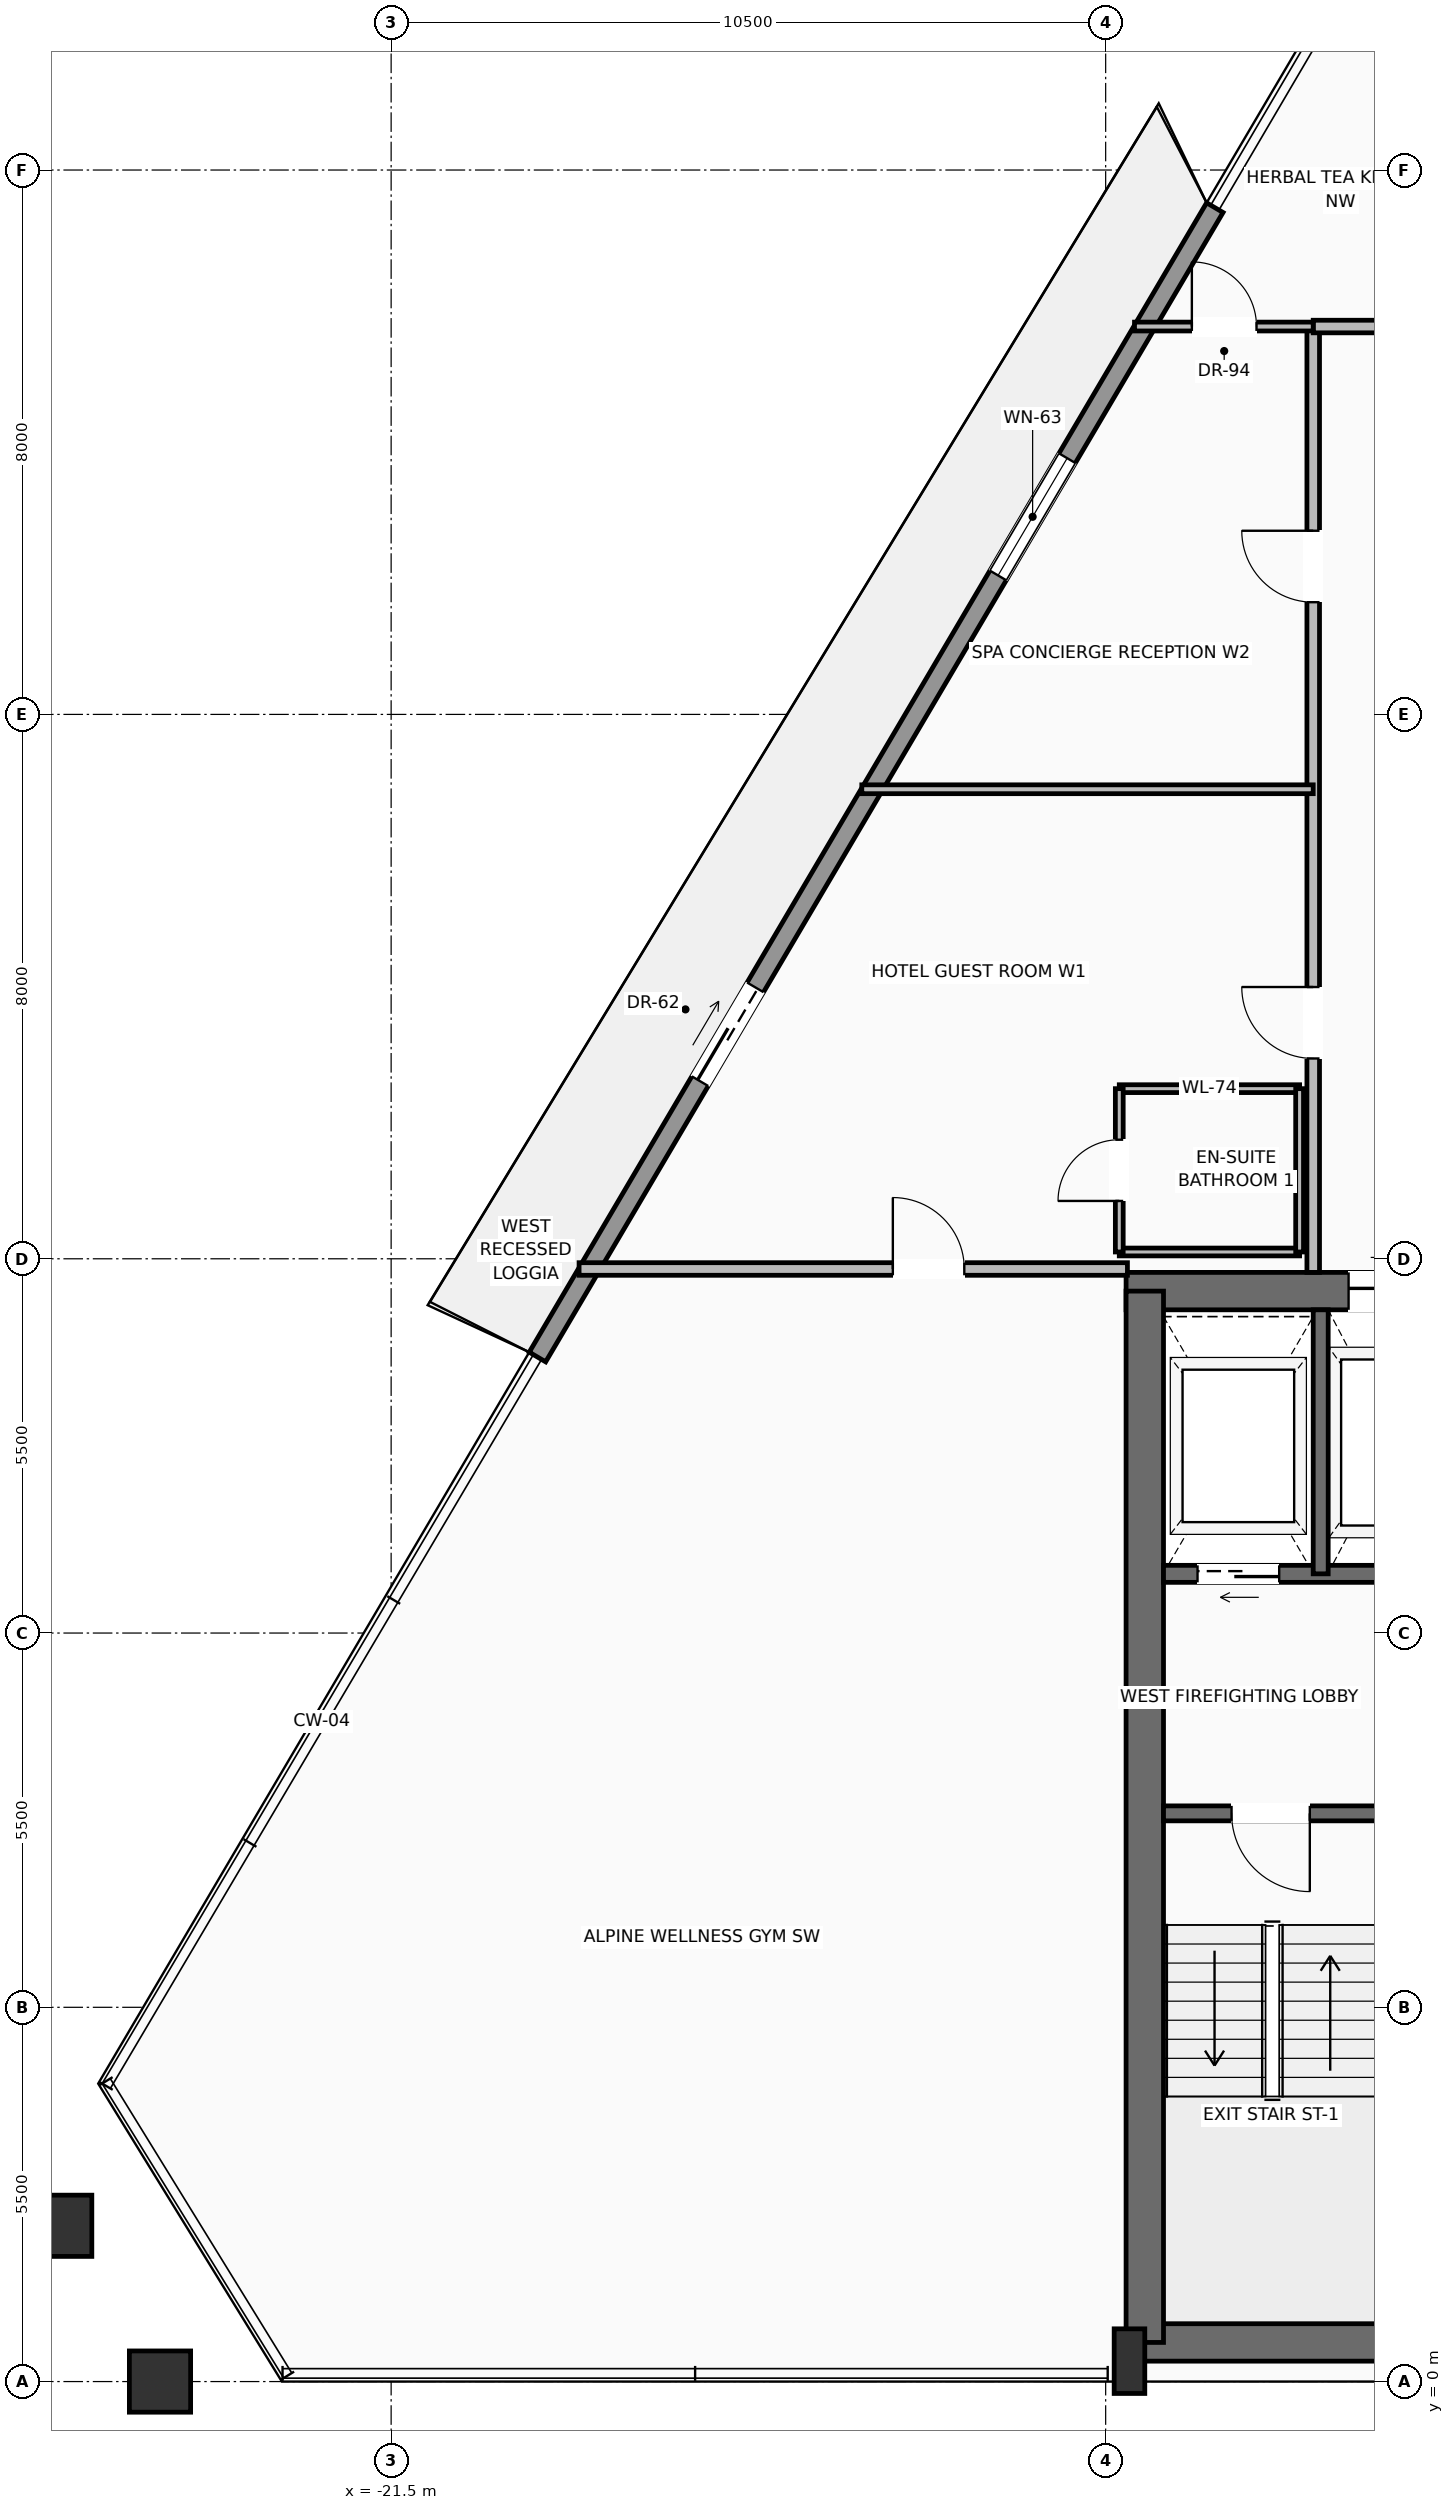
"""IFC4 building model, lengths in metres.
Left out: names, types, materials, properties, quantities, classifications, styles, units other than length and angle.
Written with IfcOpenShell. Run it as: python <this file> out.ifc"""

import sys

from ifc_helpers import new_model, si_unit, direction, frame, frame_2d, origin, origin_2d, place, context, subcontext, project, spatial, rectangle, hollow_rectangle, extrude, source, transform, mapped, element, fill, save


model = new_model("IFC4")
c1 = context("Model", 3, precision=1e-05, world=origin(), true_north=direction((0.0, 1.0)))
c2 = subcontext(c1, "Body", "Model", "MODEL_VIEW")
j1 = project(units=[si_unit("LENGTHUNIT", "METRE"), si_unit("PLANEANGLEUNIT", "RADIAN")], contexts=[c1])
p1 = place(None, origin())
s1 = spatial("IfcSite", under=j1, at=p1, CompositionType="ELEMENT")
p2 = place(p1, origin())
s2 = spatial("IfcBuilding", under=s1, at=p2, CompositionType="ELEMENT")
p3 = place(p2, frame((0.0, 0.0, 240.7)))
s3 = spatial("IfcBuildingStorey", under=s2, at=p3, CompositionType="ELEMENT", Elevation=240.7)
p4 = place(p3, frame((-10.65, 0.575, 0.0), z_axis=(0.0, 0.0, 1.0), x_axis=(1.0, 0.0, 0.0)))
e1 = element("IfcWall", 1, at=p4, inside=s3, PredefinedType="SHEAR", context=c2, shape_type="SweptSolid", body=[
    extrude(rectangle(XDim=21.3, YDim=0.55, at=frame_2d((10.65, 0.0))), origin(), (0.0, 0.0, 1.0), 3.24),
])
p5 = place(p3, frame((-10.7, 16.025, 0.0), z_axis=(0.0, 0.0, 1.0), x_axis=(1.0, 0.0, 0.0)))
e2 = element("IfcWall", 2, at=p5, inside=s3, PredefinedType="SHEAR", context=c2, shape_type="SweptSolid", body=[
    extrude(rectangle(XDim=21.4, YDim=0.55, at=frame_2d((10.7, 0.0))), origin(), (0.0, 0.0, 1.0), 3.24),
])
p6 = place(p5, frame((3.27, 0.0, 0.0)))
e3 = element("IfcOpeningElement", 3, at=p6, cuts=e2, PredefinedType="OPENING", context=c2, shape_type="SweptSolid", body=[
    extrude(rectangle(XDim=1.3, YDim=2.3, at=frame_2d((0.65, 1.15))), frame((0.0, 0.285, 0.0), z_axis=(0.0, -1.0, 0.0), x_axis=(1.0, 0.0, 0.0)), (0.0, 0.0, 1.0), 0.57),
])
p7 = place(p5, frame((9.7, 0.0, 0.0)))
e4 = element("IfcOpeningElement", 4, at=p7, cuts=e2, PredefinedType="OPENING", context=c2, shape_type="SweptSolid", body=[
    extrude(rectangle(XDim=2.0, YDim=2.4, at=frame_2d((1.0, 1.2))), frame((0.0, 0.285, 0.0), z_axis=(0.0, -1.0, 0.0), x_axis=(1.0, 0.0, 0.0)), (0.0, 0.0, 1.0), 0.57),
])
p8 = place(p3, frame((-10.425, 0.575, 0.0), z_axis=(0.0, 0.0, 1.0), x_axis=(0.0, 1.0, 0.0)))
e5 = element("IfcWall", 5, at=p8, inside=s3, PredefinedType="SHEAR", context=c2, shape_type="SweptSolid", body=[
    extrude(rectangle(XDim=15.45, YDim=0.55, at=frame_2d((7.725, 0.0))), origin(), (0.0, 0.0, 1.0), 3.24),
])
m1 = source(origin(), c2, "Body", "SweptSolid", [
    extrude(rectangle(XDim=0.45, YDim=0.95, at=origin_2d()), origin(), (0.0, 0.0, 1.0), 3.45),
])
p9 = place(p3, frame((-10.65, 0.3, 0.0), z_axis=(0.0, 0.0, 1.0), x_axis=(1.0, 0.0, 0.0)))
e6 = element("IfcColumn", 6, at=p9, inside=s3, PredefinedType="PILASTER", context=c2, shape_type="MappedRepresentation", body=[
    mapped(m1, transform((0.0, 0.0, 0.0), scale=1.0)),
])
m2 = source(origin(), c2, "Body", "SweptSolid", [
    extrude(hollow_rectangle(XDim=0.9, YDim=0.9, WallThickness=0.045, at=origin_2d()), origin(), (0.0, 0.0, 1.0), 3.441),
])
p10 = place(p3, frame((-24.896, 0.0, 0.004), z_axis=(-0.002837874348, 0.0, 0.999995973226), x_axis=(0.0, -1.0, 0.0)))
e7 = element("IfcColumn", 7, at=p10, inside=s3, PredefinedType="COLUMN", context=c2, shape_type="MappedRepresentation", body=[
    mapped(m2, transform((0.0, 0.0, 0.0), scale=1.0)),
])
m3 = source(origin(), c2, "Body", "SweptSolid", [
    extrude(hollow_rectangle(XDim=0.9, YDim=0.9, WallThickness=0.045, at=origin_2d()), origin(), (0.0, 0.0, 1.0), 3.442),
])
p11 = place(p3, frame((-26.348, 2.289, 0.004), z_axis=(0.009292293809, -0.017236850348, 0.99980825375), x_axis=(0.880238364015, 0.474531792946, 0.0)))
e8 = element("IfcColumn", 8, at=p11, inside=s3, PredefinedType="COLUMN", context=c2, shape_type="MappedRepresentation", body=[
    mapped(m3, transform((0.0, 0.0, 0.0), scale=1.0)),
])
p12 = place(p3, frame((-19.35, 15.056, 0.0), z_axis=(0.0, 0.0, 1.0), x_axis=(0.507707822225, 0.861529318858, 0.0)))
e9 = element("IfcWall", 9, at=p12, inside=s3, PredefinedType="SOLIDWALL", context=c2, shape_type="SweptSolid", body=[
    extrude(rectangle(XDim=19.606, YDim=0.28, at=frame_2d((9.803, 0.0))), origin(), (0.0, 0.0, 1.0), 2.82),
])
p13 = place(p12, frame((4.705, 0.0, 0.0)))
e10 = element("IfcOpeningElement", 10, at=p13, cuts=e9, PredefinedType="OPENING", context=c2, shape_type="SweptSolid", body=[
    extrude(rectangle(XDim=1.6, YDim=2.35, at=frame_2d((0.8, 1.175))), frame((0.0, 0.15, 0.0), z_axis=(0.0, -1.0, 0.0), x_axis=(1.0, 0.0, 0.0)), (0.0, 0.0, 1.0), 0.3),
])
p14 = place(p12, frame((13.332, 0.0, 0.9)))
e11 = element("IfcOpeningElement", 11, at=p14, cuts=e9, PredefinedType="OPENING", context=c2, shape_type="SweptSolid", body=[
    extrude(rectangle(XDim=2.0, YDim=1.75, at=frame_2d((1.0, 0.875))), frame((0.0, 0.15, 0.0), z_axis=(0.0, -1.0, 0.0), x_axis=(1.0, 0.0, 0.0)), (0.0, 0.0, 1.0), 0.3),
])
p15 = place(p3, frame((-5.5, 8.35, 0.0), z_axis=(0.0, 0.0, 1.0), x_axis=(-1.0, 0.0, 0.0)))
e12 = element("IfcWall", 12, at=p15, inside=s3, PredefinedType="SOLIDWALL", context=c2, shape_type="SweptSolid", body=[
    extrude(rectangle(XDim=4.65, YDim=0.22, at=frame_2d((2.325, 0.0))), origin(), (0.0, 0.0, 1.0), 3.24),
])
p16 = place(p15, frame((2.5, 0.0, 0.0)))
e13 = element("IfcOpeningElement", 13, at=p16, cuts=e12, PredefinedType="OPENING", context=c2, shape_type="SweptSolid", body=[
    extrude(rectangle(XDim=1.15, YDim=2.2, at=frame_2d((0.575, 1.1))), frame((0.0, 0.12, 0.0), z_axis=(0.0, -1.0, 0.0), x_axis=(1.0, 0.0, 0.0)), (0.0, 0.0, 1.0), 0.24),
])
p17 = place(p3, frame((-5.5, 11.87, 0.0), z_axis=(0.0, 0.0, 1.0), x_axis=(-1.0, 0.0, 0.0)))
e14 = element("IfcWall", 14, at=p17, inside=s3, PredefinedType="SOLIDWALL", context=c2, shape_type="SweptSolid", body=[
    extrude(rectangle(XDim=4.65, YDim=0.25, at=frame_2d((2.325, 0.0))), origin(), (0.0, 0.0, 1.0), 3.24),
])
p18 = place(p17, frame((2.95, 0.0, 0.0)))
e15 = element("IfcOpeningElement", 15, at=p18, cuts=e14, PredefinedType="OPENING", context=c2, shape_type="SweptSolid", body=[
    extrude(rectangle(XDim=1.2, YDim=2.25, at=frame_2d((0.6, 1.125))), frame((0.0, 0.135, 0.0), z_axis=(0.0, -1.0, 0.0), x_axis=(1.0, 0.0, 0.0)), (0.0, 0.0, 1.0), 0.27),
])
p19 = place(p3, frame((-7.84, 11.87, 0.0), z_axis=(0.0, 0.0, 1.0), x_axis=(0.0, 1.0, 0.0)))
e16 = element("IfcWall", 16, at=p19, inside=s3, PredefinedType="SOLIDWALL", context=c2, shape_type="SweptSolid", body=[
    extrude(rectangle(XDim=3.88, YDim=0.22, at=frame_2d((1.94, 0.0))), origin(), (0.0, 0.0, 1.0), 3.24),
])
p20 = place(p3, frame((-7.95, 16.3, 0.0), z_axis=(0.0, 0.0, 1.0), x_axis=(0.0, 1.0, 0.0)))
e17 = element("IfcWall", 17, at=p20, inside=s3, PredefinedType="PARTITIONING", context=c2, shape_type="SweptSolid", body=[
    extrude(rectangle(XDim=13.9, YDim=0.185, at=frame_2d((6.95, 0.0))), origin(), (0.0, 0.0, 1.0), 3.232),
])
p21 = place(p20, frame((3.144, 0.0, 0.0)))
e18 = element("IfcOpeningElement", 18, at=p21, cuts=e17, PredefinedType="OPENING", context=c2, shape_type="SweptSolid", body=[
    extrude(rectangle(XDim=1.05, YDim=2.25, at=frame_2d((0.525, 1.125))), frame((0.0, 0.103, 0.0), z_axis=(0.0, -1.0, 0.0), x_axis=(1.0, 0.0, 0.0)), (0.0, 0.0, 1.0), 0.205),
])
p22 = place(p20, frame((9.849, 0.0, 0.0)))
e19 = element("IfcOpeningElement", 19, at=p22, cuts=e17, PredefinedType="OPENING", context=c2, shape_type="SweptSolid", body=[
    extrude(rectangle(XDim=1.05, YDim=2.25, at=frame_2d((0.525, 1.125))), frame((0.0, 0.103, 0.0), z_axis=(0.0, -1.0, 0.0), x_axis=(1.0, 0.0, 0.0)), (0.0, 0.0, 1.0), 0.205),
])
p23 = place(p3, frame((-7.95, 30.2, 0.0), z_axis=(0.0, 0.0, 1.0), x_axis=(1.0, 0.0, 0.0)))
e20 = element("IfcWall", 20, at=p23, inside=s3, PredefinedType="PARTITIONING", context=c2, shape_type="SweptSolid", body=[
    extrude(rectangle(XDim=16.6, YDim=0.185, at=frame_2d((8.3, 0.0))), origin(), (0.0, 0.0, 1.0), 3.232),
])
p24 = place(p23, frame((3.25, 0.0, 0.0)))
e21 = element("IfcOpeningElement", 21, at=p24, cuts=e20, PredefinedType="OPENING", context=c2, shape_type="SweptSolid", body=[
    extrude(rectangle(XDim=1.05, YDim=2.25, at=frame_2d((0.525, 1.125))), frame((0.0, 0.103, 0.0), z_axis=(0.0, -1.0, 0.0), x_axis=(1.0, 0.0, 0.0)), (0.0, 0.0, 1.0), 0.205),
])
p25 = place(p23, frame((7.775, 0.0, 0.0)))
e22 = element("IfcOpeningElement", 22, at=p25, cuts=e20, PredefinedType="OPENING", context=c2, shape_type="SweptSolid", body=[
    extrude(rectangle(XDim=1.05, YDim=2.25, at=frame_2d((0.525, 1.125))), frame((0.0, 0.103, 0.0), z_axis=(0.0, -1.0, 0.0), x_axis=(1.0, 0.0, 0.0)), (0.0, 0.0, 1.0), 0.205),
])
p26 = place(p23, frame((11.6, 0.0, 0.0)))
e23 = element("IfcOpeningElement", 23, at=p26, cuts=e20, PredefinedType="OPENING", context=c2, shape_type="SweptSolid", body=[
    extrude(rectangle(XDim=1.05, YDim=2.25, at=frame_2d((0.525, 1.125))), frame((0.0, 0.103, 0.0), z_axis=(0.0, -1.0, 0.0), x_axis=(1.0, 0.0, 0.0)), (0.0, 0.0, 1.0), 0.205),
])
p27 = place(p3, frame((-18.738, 16.35, 0.0), z_axis=(0.0, 0.0, 1.0), x_axis=(1.0, 0.0, 0.0)))
e24 = element("IfcWall", 24, at=p27, inside=s3, PredefinedType="PARTITIONING", context=c2, shape_type="SweptSolid", body=[
    extrude(rectangle(XDim=8.058, YDim=0.185, at=frame_2d((4.029, 0.0))), origin(), (0.0, 0.0, 1.0), 3.232),
])
p28 = place(p27, frame((4.611, 0.0, 0.0)))
e25 = element("IfcOpeningElement", 25, at=p28, cuts=e24, PredefinedType="OPENING", context=c2, shape_type="SweptSolid", body=[
    extrude(rectangle(XDim=1.05, YDim=2.25, at=frame_2d((0.525, 1.125))), frame((0.0, 0.103, 0.0), z_axis=(0.0, -1.0, 0.0), x_axis=(1.0, 0.0, 0.0)), (0.0, 0.0, 1.0), 0.205),
])
p29 = place(p3, frame((-10.576, 30.2, 0.0), z_axis=(0.0, 0.0, 1.0), x_axis=(1.0, 0.0, 0.0)))
e26 = element("IfcWall", 26, at=p29, inside=s3, PredefinedType="PARTITIONING", context=c2, shape_type="SweptSolid", body=[
    extrude(rectangle(XDim=2.626, YDim=0.13, at=frame_2d((1.313, 0.0))), origin(), (0.0, 0.0, 1.0), 3.232),
])
p30 = place(p29, frame((0.843, 0.0, 0.0)))
e27 = element("IfcOpeningElement", 27, at=p30, cuts=e26, PredefinedType="OPENING", context=c2, shape_type="SweptSolid", body=[
    extrude(rectangle(XDim=0.95, YDim=2.2, at=frame_2d((0.475, 1.1))), frame((0.0, 0.075, 0.0), z_axis=(0.0, -1.0, 0.0), x_axis=(1.0, 0.0, 0.0)), (0.0, 0.0, 1.0), 0.15),
])
for number, where, z_axis, x_axis in (
    (28, (-10.8, 16.6, 0.0), (0.0, 0.0, 1.0), (1.0, 0.0, 0.0)),
    (29, (-10.8, 19.0, 0.0), (0.0, 0.0, 1.0), (1.0, 0.0, 0.0)),
):
    element("IfcWall", number, at=place(p3, frame(where, z_axis=z_axis, x_axis=x_axis)), inside=s3, PredefinedType="PARTITIONING", context=c2, shape_type="SweptSolid", body=[
        extrude(rectangle(XDim=2.65, YDim=0.115, at=frame_2d((1.325, 0.0))), origin(), (0.0, 0.0, 1.0), 3.232),
    ])
p31 = place(p3, frame((-10.8, 16.6, 0.0), z_axis=(0.0, 0.0, 1.0), x_axis=(0.0, 1.0, 0.0)))
e30 = element("IfcWall", 30, at=p31, inside=s3, PredefinedType="PARTITIONING", context=c2, shape_type="SweptSolid", body=[
    extrude(rectangle(XDim=2.4, YDim=0.115, at=frame_2d((1.2, 0.0))), origin(), (0.0, 0.0, 1.0), 3.232),
])
p32 = place(p31, frame((0.75, 0.0, 0.0)))
e31 = element("IfcOpeningElement", 31, at=p32, cuts=e30, PredefinedType="OPENING", context=c2, shape_type="SweptSolid", body=[
    extrude(rectangle(XDim=0.9, YDim=2.15, at=frame_2d((0.45, 1.075))), frame((0.0, 0.067, 0.0), z_axis=(0.0, -1.0, 0.0), x_axis=(1.0, 0.0, 0.0)), (0.0, 0.0, 1.0), 0.135),
])
p33 = place(p3, frame((-8.15, 16.6, 0.0), z_axis=(0.0, 0.0, 1.0), x_axis=(0.0, 1.0, 0.0)))
e32 = element("IfcWall", 32, at=p33, inside=s3, PredefinedType="PARTITIONING", context=c2, shape_type="SweptSolid", body=[
    extrude(rectangle(XDim=2.4, YDim=0.115, at=frame_2d((1.2, 0.0))), origin(), (0.0, 0.0, 1.0), 3.232),
])
p34 = place(p3, frame((-14.583, 23.4, 0.0), z_axis=(0.0, 0.0, 1.0), x_axis=(1.0, 0.0, 0.0)))
e33 = element("IfcWall", 33, at=p34, inside=s3, PredefinedType="PARTITIONING", context=c2, shape_type="SweptSolid", body=[
    extrude(rectangle(XDim=6.634, YDim=0.13, at=frame_2d((3.317, 0.0))), origin(), (0.0, 0.0, 1.0), 3.232),
])
m4 = source(origin(), c2, "Body", "SweptSolid", [
    extrude(rectangle(XDim=1.6, YDim=2.35, at=frame_2d((0.8, 1.175))), frame((0.0, 0.025, 0.0), z_axis=(0.0, -1.0, 0.0), x_axis=(1.0, 0.0, 0.0)), (0.0, 0.0, 1.0), 0.05),
])
p35 = place(p13, origin())
e34 = element("IfcDoor", 34, at=p35, inside=s3, OperationType="SLIDING_TO_LEFT", PredefinedType="DOOR", context=c2, shape_type="MappedRepresentation", body=[
    mapped(m4, transform((0.0, 0.0, 0.0), scale=1.0)),
])
fill(e10, e34)
m5 = source(origin(), c2, "Body", "SweptSolid", [
    extrude(rectangle(XDim=2.0, YDim=1.75, at=frame_2d((1.0, 0.875))), frame((0.0, 0.03, 0.0), z_axis=(0.0, -1.0, 0.0), x_axis=(1.0, 0.0, 0.0)), (0.0, 0.0, 1.0), 0.06),
])
p36 = place(p14, origin())
e35 = element("IfcWindow", 35, at=p36, inside=s3, PartitioningType="SINGLE_PANEL", PredefinedType="WINDOW", context=c2, shape_type="MappedRepresentation", body=[
    mapped(m5, transform((0.0, 0.0, 0.0), scale=1.0)),
])
fill(e11, e35)
m6 = source(origin(), c2, "Body", "SweptSolid", [
    extrude(rectangle(XDim=1.15, YDim=2.2, at=frame_2d((0.575, 1.1))), frame((0.0, 0.025, 0.0), z_axis=(0.0, -1.0, 0.0), x_axis=(1.0, 0.0, 0.0)), (0.0, 0.0, 1.0), 0.05),
])
p37 = place(p16, origin())
e36 = element("IfcDoor", 36, at=p37, inside=s3, OperationType="SINGLE_SWING_LEFT", PredefinedType="DOOR", context=c2, shape_type="MappedRepresentation", body=[
    mapped(m6, transform((0.0, 0.0, 0.0), scale=1.0)),
])
fill(e13, e36)
m7 = source(origin(), c2, "Body", "SweptSolid", [
    extrude(rectangle(XDim=1.2, YDim=2.25, at=frame_2d((0.6, 1.125))), frame((0.0, 0.025, 0.0), z_axis=(0.0, -1.0, 0.0), x_axis=(1.0, 0.0, 0.0)), (0.0, 0.0, 1.0), 0.05),
])
p38 = place(p18, origin())
e37 = element("IfcDoor", 37, at=p38, inside=s3, OperationType="SLIDING_TO_LEFT", PredefinedType="DOOR", context=c2, shape_type="MappedRepresentation", body=[
    mapped(m7, transform((0.0, 0.0, 0.0), scale=1.0)),
])
fill(e15, e37)
m8 = source(origin(), c2, "Body", "SweptSolid", [
    extrude(rectangle(XDim=1.3, YDim=2.3, at=frame_2d((0.65, 1.15))), frame((0.0, 0.025, 0.0), z_axis=(0.0, -1.0, 0.0), x_axis=(1.0, 0.0, 0.0)), (0.0, 0.0, 1.0), 0.05),
])
p39 = place(p6, origin())
e38 = element("IfcDoor", 38, at=p39, inside=s3, OperationType="SLIDING_TO_RIGHT", PredefinedType="DOOR", context=c2, shape_type="MappedRepresentation", body=[
    mapped(m8, transform((0.0, 0.0, 0.0), scale=1.0)),
])
fill(e3, e38)
m9 = source(origin(), c2, "Body", "SweptSolid", [
    extrude(rectangle(XDim=1.05, YDim=2.25, at=frame_2d((0.525, 1.125))), frame((0.0, 0.025, 0.0), z_axis=(0.0, -1.0, 0.0), x_axis=(1.0, 0.0, 0.0)), (0.0, 0.0, 1.0), 0.05),
])
p40 = place(p28, origin())
e39 = element("IfcDoor", 39, at=p40, inside=s3, OperationType="SINGLE_SWING_LEFT", PredefinedType="DOOR", context=c2, shape_type="MappedRepresentation", body=[
    mapped(m9, transform((0.0, 0.0, 0.0), scale=1.0)),
])
fill(e25, e39)
p41 = place(p21, origin())
e40 = element("IfcDoor", 40, at=p41, inside=s3, OperationType="SINGLE_SWING_RIGHT", PredefinedType="DOOR", context=c2, shape_type="MappedRepresentation", body=[
    mapped(m9, transform((0.0, 0.0, 0.0), scale=1.0)),
])
fill(e18, e40)
m10 = source(origin(), c2, "Body", "SweptSolid", [
    extrude(rectangle(XDim=0.9, YDim=2.15, at=frame_2d((0.45, 1.075))), frame((0.0, 0.025, 0.0), z_axis=(0.0, -1.0, 0.0), x_axis=(1.0, 0.0, 0.0)), (0.0, 0.0, 1.0), 0.05),
])
p42 = place(p32, origin())
e41 = element("IfcDoor", 41, at=p42, inside=s3, OperationType="SINGLE_SWING_LEFT", PredefinedType="DOOR", context=c2, shape_type="MappedRepresentation", body=[
    mapped(m10, transform((0.0, 0.0, 0.0), scale=1.0)),
])
fill(e31, e41)
p43 = place(p22, origin())
e42 = element("IfcDoor", 42, at=p43, inside=s3, OperationType="SINGLE_SWING_RIGHT", PredefinedType="DOOR", context=c2, shape_type="MappedRepresentation", body=[
    mapped(m9, transform((0.0, 0.0, 0.0), scale=1.0)),
])
fill(e19, e42)
m11 = source(origin(), c2, "Body", "SweptSolid", [
    extrude(rectangle(XDim=0.95, YDim=2.2, at=frame_2d((0.475, 1.1))), frame((0.0, 0.025, 0.0), z_axis=(0.0, -1.0, 0.0), x_axis=(1.0, 0.0, 0.0)), (0.0, 0.0, 1.0), 0.05),
])
p44 = place(p30, origin())
e43 = element("IfcDoor", 43, at=p44, inside=s3, OperationType="SINGLE_SWING_LEFT", PredefinedType="DOOR", context=c2, shape_type="MappedRepresentation", body=[
    mapped(m11, transform((0.0, 0.0, 0.0), scale=1.0)),
])
fill(e27, e43)
save(model, sys.argv[1])
